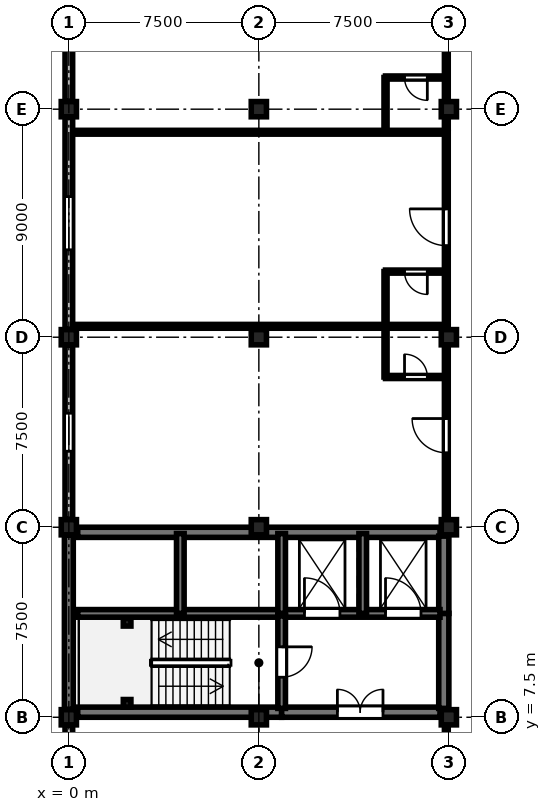
"""IFC4 building model, lengths in metres.
Left out: names, types, materials, properties, quantities, classifications, styles, units other than length and angle.
Written with IfcOpenShell. Run it as: python <this file> out.ifc"""

import sys

from ifc_helpers import new_model, si_unit, direction, frame, frame_2d, origin, origin_2d, place, context, subcontext, project, spatial, rectangle, circle, i_section, extrude, element, fill, save


model = new_model("IFC4")
c1 = context("Model", 3, precision=1e-05, world=origin(), true_north=direction((0.0, 1.0)))
c2 = subcontext(c1, "Body", "Model", "MODEL_VIEW")
j1 = project(units=[si_unit("LENGTHUNIT", "METRE"), si_unit("PLANEANGLEUNIT", "RADIAN")], contexts=[c1])
p1 = place(None, origin())
s1 = spatial("IfcSite", under=j1, at=p1, CompositionType="ELEMENT")
p2 = place(p1, origin())
s2 = spatial("IfcBuilding", under=s1, at=p2, CompositionType="ELEMENT")
p3 = place(p2, frame((0.0, 0.0, 21.9)))
s3 = spatial("IfcBuildingStorey", under=s2, at=p3, CompositionType="ELEMENT", Elevation=21.9)
for number, where, z_axis, x_axis in (
    (1, (0.0, 7.5, 0.0), (0.0, 0.0, 1.0), (1.0, 0.0, 0.0)),
    (2, (0.0, 15.0, 0.0), (0.0, 0.0, 1.0), (1.0, 0.0, 0.0)),
):
    element("IfcColumn", number, at=place(p3, frame(where, z_axis=z_axis, x_axis=x_axis)), inside=s3, PredefinedType="COLUMN", context=c2, shape_type="SweptSolid", body=[
        extrude(rectangle(XDim=0.6, YDim=0.6, at=origin_2d()), origin(), (0.0, 0.0, 1.0), 4.05),
    ])
p4 = place(p3, frame((0.0, 22.5, 0.0), z_axis=(0.0, 0.0, 1.0), x_axis=(1.0, 0.0, 0.0)))
e3 = element("IfcColumn", 3, at=p4, inside=s3, PredefinedType="COLUMN", context=c2, shape_type="SweptSolid", body=[
    extrude(circle(Radius=0.3, at=origin_2d()), origin(), (0.0, 0.0, 1.0), 4.05),
])
for number, where, z_axis, x_axis in (
    (4, (0.0, 31.5, 0.0), (0.0, 0.0, 1.0), (1.0, 0.0, 0.0)),
    (5, (7.5, 7.5, 0.0), (0.0, 0.0, 1.0), (1.0, 0.0, 0.0)),
):
    element("IfcColumn", number, at=place(p3, frame(where, z_axis=z_axis, x_axis=x_axis)), inside=s3, PredefinedType="COLUMN", context=c2, shape_type="SweptSolid", body=[
        extrude(rectangle(XDim=0.6, YDim=0.6, at=origin_2d()), origin(), (0.0, 0.0, 1.0), 4.05),
    ])
p5 = place(p3, frame((7.5, 15.0, 0.0), z_axis=(0.0, 0.0, 1.0), x_axis=(1.0, 0.0, 0.0)))
e6 = element("IfcColumn", 6, at=p5, inside=s3, PredefinedType="COLUMN", context=c2, shape_type="SweptSolid", body=[
    extrude(circle(Radius=0.3, at=origin_2d()), origin(), (0.0, 0.0, 1.0), 4.05),
])
for number, where, z_axis, x_axis in (
    (7, (7.5, 22.5, 0.0), (0.0, 0.0, 1.0), (1.0, 0.0, 0.0)),
    (8, (7.5, 31.5, 0.0), (0.0, 0.0, 1.0), (1.0, 0.0, 0.0)),
):
    element("IfcColumn", number, at=place(p3, frame(where, z_axis=z_axis, x_axis=x_axis)), inside=s3, PredefinedType="COLUMN", context=c2, shape_type="SweptSolid", body=[
        extrude(rectangle(XDim=0.6, YDim=0.6, at=origin_2d()), origin(), (0.0, 0.0, 1.0), 4.05),
    ])
p6 = place(p3, frame((15.0, 7.5, 0.0), z_axis=(0.0, 0.0, 1.0), x_axis=(1.0, 0.0, 0.0)))
e9 = element("IfcColumn", 9, at=p6, inside=s3, PredefinedType="COLUMN", context=c2, shape_type="SweptSolid", body=[
    extrude(circle(Radius=0.3, at=origin_2d()), origin(), (0.0, 0.0, 1.0), 4.05),
])
for number, where, z_axis, x_axis in (
    (10, (15.0, 15.0, 0.0), (0.0, 0.0, 1.0), (1.0, 0.0, 0.0)),
    (11, (15.0, 22.5, 0.0), (0.0, 0.0, 1.0), (1.0, 0.0, 0.0)),
):
    element("IfcColumn", number, at=place(p3, frame(where, z_axis=z_axis, x_axis=x_axis)), inside=s3, PredefinedType="COLUMN", context=c2, shape_type="SweptSolid", body=[
        extrude(rectangle(XDim=0.6, YDim=0.6, at=origin_2d()), origin(), (0.0, 0.0, 1.0), 4.05),
    ])
p7 = place(p3, frame((15.0, 31.5, 0.0), z_axis=(0.0, 0.0, 1.0), x_axis=(1.0, 0.0, 0.0)))
e12 = element("IfcColumn", 12, at=p7, inside=s3, PredefinedType="COLUMN", context=c2, shape_type="SweptSolid", body=[
    extrude(circle(Radius=0.3, at=origin_2d()), origin(), (0.0, 0.0, 1.0), 4.05),
])
for number, where, z_axis, x_axis in (
    (13, (2.3, 8.05, 0.0), (0.0, 0.0, 1.0), (1.0, 0.0, 0.0)),
    (14, (2.3, 11.25, 0.0), (0.0, 0.0, 1.0), (1.0, 0.0, 0.0)),
):
    element("IfcColumn", number, at=place(p3, frame(where, z_axis=z_axis, x_axis=x_axis)), inside=s3, PredefinedType="COLUMN", context=c2, shape_type="SweptSolid", body=[
        extrude(i_section(OverallWidth=0.3, OverallDepth=0.3, WebThickness=0.011, FlangeThickness=0.019, FilletRadius=0.027, at=origin_2d()), origin(), (0.0, 0.0, 1.0), 4.05),
    ])
p8 = place(p3, frame((0.0, 0.285, 0.0), z_axis=(0.0, 0.0, 1.0), x_axis=(0.0, 1.0, 0.0)))
e15 = element("IfcWall", 15, at=p8, inside=s3, PredefinedType="STANDARD", context=c2, shape_type="SweptSolid", body=[
    extrude(rectangle(XDim=6.905, YDim=0.3, at=frame_2d((3.453, 0.0))), origin(), (0.0, 0.0, 1.0), 3.17),
])
p9 = place(p8, frame((2.552, 0.0, 0.9)))
e16 = element("IfcOpeningElement", 16, at=p9, cuts=e15, PredefinedType="OPENING", context=c2, shape_type="SweptSolid", body=[
    extrude(rectangle(XDim=1.8, YDim=1.8, at=frame_2d((0.9, 0.9))), frame((0.0, 0.16, 0.0), z_axis=(0.0, -1.0, 0.0), x_axis=(1.0, 0.0, 0.0)), (0.0, 0.0, 1.0), 0.32),
])
p10 = place(p3, frame((0.0, 7.81, 0.0), z_axis=(0.0, 0.0, 1.0), x_axis=(0.0, 1.0, 0.0)))
e17 = element("IfcWall", 17, at=p10, inside=s3, PredefinedType="SHEAR", context=c2, shape_type="SweptSolid", body=[
    extrude(rectangle(XDim=6.88, YDim=0.35, at=frame_2d((3.44, 0.0))), origin(), (0.0, 0.0, 1.0), 3.77),
])
p11 = place(p3, frame((0.0, 15.31, 0.0), z_axis=(0.0, 0.0, 1.0), x_axis=(0.0, 1.0, 0.0)))
e18 = element("IfcWall", 18, at=p11, inside=s3, PredefinedType="STANDARD", context=c2, shape_type="SweptSolid", body=[
    extrude(rectangle(XDim=6.88, YDim=0.3, at=frame_2d((3.44, 0.0))), origin(), (0.0, 0.0, 1.0), 3.17),
])
p12 = place(p11, frame((2.69, 0.0, 0.9)))
e19 = element("IfcOpeningElement", 19, at=p12, cuts=e18, PredefinedType="OPENING", context=c2, shape_type="SweptSolid", body=[
    extrude(rectangle(XDim=1.5, YDim=1.99, at=frame_2d((0.75, 0.995))), frame((0.0, 0.16, 0.0), z_axis=(0.0, -1.0, 0.0), x_axis=(1.0, 0.0, 0.0)), (0.0, 0.0, 1.0), 0.32),
])
p13 = place(p3, frame((0.0, 22.81, 0.0), z_axis=(0.0, 0.0, 1.0), x_axis=(0.0, 1.0, 0.0)))
e20 = element("IfcWall", 20, at=p13, inside=s3, PredefinedType="STANDARD", context=c2, shape_type="SweptSolid", body=[
    extrude(rectangle(XDim=8.38, YDim=0.3, at=frame_2d((4.19, 0.0))), origin(), (0.0, 0.0, 1.0), 3.22),
])
p14 = place(p13, frame((3.14, 0.0, 0.9)))
e21 = element("IfcOpeningElement", 21, at=p14, cuts=e20, PredefinedType="OPENING", context=c2, shape_type="SweptSolid", body=[
    extrude(rectangle(XDim=2.1, YDim=2.04, at=frame_2d((1.05, 1.02))), frame((0.0, 0.16, 0.0), z_axis=(0.0, -1.0, 0.0), x_axis=(1.0, 0.0, 0.0)), (0.0, 0.0, 1.0), 0.32),
])
p15 = place(p3, frame((0.0, 31.81, 0.0), z_axis=(0.0, 0.0, 1.0), x_axis=(0.0, 1.0, 0.0)))
e22 = element("IfcWall", 22, at=p15, inside=s3, PredefinedType="STANDARD", context=c2, shape_type="SweptSolid", body=[
    extrude(rectangle(XDim=6.88, YDim=0.3, at=frame_2d((3.44, 0.0))), origin(), (0.0, 0.0, 1.0), 3.17),
])
p16 = place(p15, frame((2.24, 0.0, 0.9)))
e23 = element("IfcOpeningElement", 23, at=p16, cuts=e22, PredefinedType="OPENING", context=c2, shape_type="SweptSolid", body=[
    extrude(rectangle(XDim=2.4, YDim=1.99, at=frame_2d((1.2, 0.995))), frame((0.0, 0.16, 0.0), z_axis=(0.0, -1.0, 0.0), x_axis=(1.0, 0.0, 0.0)), (0.0, 0.0, 1.0), 0.32),
])
p17 = place(p3, frame((0.35, 7.7, 0.0), z_axis=(0.0, 0.0, 1.0), x_axis=(1.0, 0.0, 0.0)))
e24 = element("IfcWall", 24, at=p17, inside=s3, PredefinedType="SHEAR", context=c2, shape_type="SweptSolid", body=[
    extrude(rectangle(XDim=8.05, YDim=0.4, at=frame_2d((4.025, 0.0))), origin(), (0.0, 0.0, 1.0), 3.77),
])
p18 = place(p3, frame((8.4, 7.7, 0.0), z_axis=(0.0, 0.0, 1.0), x_axis=(1.0, 0.0, 0.0)))
e25 = element("IfcWall", 25, at=p18, inside=s3, PredefinedType="SHEAR", context=c2, shape_type="SweptSolid", body=[
    extrude(rectangle(XDim=6.25, YDim=0.4, at=frame_2d((3.125, 0.0))), origin(), (0.0, 0.0, 1.0), 3.77),
])
p19 = place(p18, frame((2.2, 0.0, 0.0)))
e26 = element("IfcOpeningElement", 26, at=p19, cuts=e25, PredefinedType="OPENING", context=c2, shape_type="SweptSolid", body=[
    extrude(rectangle(XDim=1.8, YDim=2.25, at=frame_2d((0.9, 1.125))), frame((0.0, 0.21, 0.0), z_axis=(0.0, -1.0, 0.0), x_axis=(1.0, 0.0, 0.0)), (0.0, 0.0, 1.0), 0.42),
])
p20 = place(p3, frame((0.35, 14.8, 0.0), z_axis=(0.0, 0.0, 1.0), x_axis=(1.0, 0.0, 0.0)))
e27 = element("IfcWall", 27, at=p20, inside=s3, PredefinedType="SHEAR", context=c2, shape_type="SweptSolid", body=[
    extrude(rectangle(XDim=14.3, YDim=0.4, at=frame_2d((7.15, 0.0))), origin(), (0.0, 0.0, 1.0), 3.77),
])
p21 = place(p3, frame((14.8, 7.85, 0.0), z_axis=(0.0, 0.0, 1.0), x_axis=(0.0, 1.0, 0.0)))
e28 = element("IfcWall", 28, at=p21, inside=s3, PredefinedType="SHEAR", context=c2, shape_type="SweptSolid", body=[
    extrude(rectangle(XDim=3.75, YDim=0.4, at=frame_2d((1.875, 0.0))), origin(), (0.0, 0.0, 1.0), 3.77),
])
p22 = place(p3, frame((14.8, 11.6, 0.0), z_axis=(0.0, 0.0, 1.0), x_axis=(0.0, 1.0, 0.0)))
e29 = element("IfcWall", 29, at=p22, inside=s3, PredefinedType="SHEAR", context=c2, shape_type="SweptSolid", body=[
    extrude(rectangle(XDim=3.05, YDim=0.4, at=frame_2d((1.525, 0.0))), origin(), (0.0, 0.0, 1.0), 3.77),
])
p23 = place(p3, frame((0.35, 11.6, 0.0), z_axis=(0.0, 0.0, 1.0), x_axis=(1.0, 0.0, 0.0)))
e30 = element("IfcWall", 30, at=p23, inside=s3, PredefinedType="SHEAR", context=c2, shape_type="SweptSolid", body=[
    extrude(rectangle(XDim=8.05, YDim=0.3, at=frame_2d((4.025, 0.0))), origin(), (0.0, 0.0, 1.0), 3.77),
])
p24 = place(p3, frame((8.4, 11.6, 0.0), z_axis=(0.0, 0.0, 1.0), x_axis=(1.0, 0.0, 0.0)))
e31 = element("IfcWall", 31, at=p24, inside=s3, PredefinedType="SHEAR", context=c2, shape_type="SweptSolid", body=[
    extrude(rectangle(XDim=6.25, YDim=0.3, at=frame_2d((3.125, 0.0))), origin(), (0.0, 0.0, 1.0), 3.77),
])
p25 = place(p24, frame((0.9, 0.0, 0.0)))
e32 = element("IfcOpeningElement", 32, at=p25, cuts=e31, PredefinedType="OPENING", context=c2, shape_type="SweptSolid", body=[
    extrude(rectangle(XDim=1.4, YDim=2.25, at=frame_2d((0.7, 1.125))), frame((0.0, 0.16, 0.0), z_axis=(0.0, -1.0, 0.0), x_axis=(1.0, 0.0, 0.0)), (0.0, 0.0, 1.0), 0.32),
])
p26 = place(p24, frame((4.1, 0.0, 0.0)))
e33 = element("IfcOpeningElement", 33, at=p26, cuts=e31, PredefinedType="OPENING", context=c2, shape_type="SweptSolid", body=[
    extrude(rectangle(XDim=1.4, YDim=2.25, at=frame_2d((0.7, 1.125))), frame((0.0, 0.16, 0.0), z_axis=(0.0, -1.0, 0.0), x_axis=(1.0, 0.0, 0.0)), (0.0, 0.0, 1.0), 0.32),
])
p27 = place(p3, frame((8.4, 11.5, 0.0), z_axis=(0.0, 0.0, 1.0), x_axis=(0.0, -1.0, 0.0)))
e34 = element("IfcWall", 34, at=p27, inside=s3, PredefinedType="SHEAR", context=c2, shape_type="SweptSolid", body=[
    extrude(rectangle(XDim=3.65, YDim=0.3, at=frame_2d((1.825, 0.0))), origin(), (0.0, 0.0, 1.0), 3.77),
])
p28 = place(p27, frame((1.22, 0.0, 0.0)))
e35 = element("IfcOpeningElement", 35, at=p28, cuts=e34, PredefinedType="OPENING", context=c2, shape_type="SweptSolid", body=[
    extrude(rectangle(XDim=1.2, YDim=2.25, at=frame_2d((0.6, 1.125))), frame((0.0, 0.16, 0.0), z_axis=(0.0, -1.0, 0.0), x_axis=(1.0, 0.0, 0.0)), (0.0, 0.0, 1.0), 0.32),
])
for number, where, z_axis, x_axis in (
    (36, (4.4, 11.6, 0.0), (0.0, 0.0, 1.0), (0.0, 1.0, 0.0)),
    (37, (8.4, 11.6, 0.0), (0.0, 0.0, 1.0), (0.0, 1.0, 0.0)),
    (38, (11.6, 11.6, 0.0), (0.0, 0.0, 1.0), (0.0, 1.0, 0.0)),
):
    element("IfcWall", number, at=place(p3, frame(where, z_axis=z_axis, x_axis=x_axis)), inside=s3, PredefinedType="SHEAR", context=c2, shape_type="SweptSolid", body=[
        extrude(rectangle(XDim=3.15, YDim=0.3, at=frame_2d((1.575, 0.0))), origin(), (0.0, 0.0, 1.0), 3.77),
    ])
p29 = place(p3, frame((14.9, 2.68, 0.0), z_axis=(0.0, 0.0, 1.0), x_axis=(0.0, 1.0, 0.0)))
e39 = element("IfcWall", 39, at=p29, inside=s3, PredefinedType="PARTITIONING", context=c2, shape_type="SweptSolid", body=[
    extrude(rectangle(XDim=4.39, YDim=0.15, at=frame_2d((2.195, 0.0))), origin(), (0.0, 0.0, 1.0), 3.205),
])
p30 = place(p29, frame((0.504, 0.0, 0.0)))
e40 = element("IfcOpeningElement", 40, at=p30, cuts=e39, PredefinedType="OPENING", context=c2, shape_type="SweptSolid", body=[
    extrude(rectangle(XDim=1.35, YDim=2.25, at=frame_2d((0.675, 1.125))), frame((0.0, 0.085, 0.0), z_axis=(0.0, -1.0, 0.0), x_axis=(1.0, 0.0, 0.0)), (0.0, 0.0, 1.0), 0.17),
])
p31 = place(p3, frame((14.9, 15.43, 0.0), z_axis=(0.0, 0.0, 1.0), x_axis=(0.0, 1.0, 0.0)))
e41 = element("IfcWall", 41, at=p31, inside=s3, PredefinedType="PARTITIONING", context=c2, shape_type="SweptSolid", body=[
    extrude(rectangle(XDim=7.5, YDim=0.15, at=frame_2d((3.75, 0.0))), origin(), (0.0, 0.0, 1.0), 3.055),
])
p32 = place(p31, frame((2.51, 0.0, 0.0)))
e42 = element("IfcOpeningElement", 42, at=p32, cuts=e41, PredefinedType="OPENING", context=c2, shape_type="SweptSolid", body=[
    extrude(rectangle(XDim=1.35, YDim=2.25, at=frame_2d((0.675, 1.125))), frame((0.0, 0.085, 0.0), z_axis=(0.0, -1.0, 0.0), x_axis=(1.0, 0.0, 0.0)), (0.0, 0.0, 1.0), 0.17),
])
p33 = place(p3, frame((12.5, 20.93, 0.0), z_axis=(0.0, 0.0, 1.0), x_axis=(1.0, 0.0, 0.0)))
e43 = element("IfcWall", 43, at=p33, inside=s3, PredefinedType="PARTITIONING", context=c2, shape_type="SweptSolid", body=[
    extrude(rectangle(XDim=2.4, YDim=0.12, at=frame_2d((1.2, 0.0))), origin(), (0.0, 0.0, 1.0), 3.755),
])
p34 = place(p33, frame((0.75, 0.0, 0.0)))
e44 = element("IfcOpeningElement", 44, at=p34, cuts=e43, PredefinedType="OPENING", context=c2, shape_type="SweptSolid", body=[
    extrude(rectangle(XDim=0.9, YDim=2.1, at=frame_2d((0.45, 1.05))), frame((0.0, 0.07, 0.0), z_axis=(0.0, -1.0, 0.0), x_axis=(1.0, 0.0, 0.0)), (0.0, 0.0, 1.0), 0.14),
])
p35 = place(p3, frame((12.5, 20.93, 0.0), z_axis=(0.0, 0.0, 1.0), x_axis=(0.0, 1.0, 0.0)))
e45 = element("IfcWall", 45, at=p35, inside=s3, PredefinedType="PARTITIONING", context=c2, shape_type="SweptSolid", body=[
    extrude(rectangle(XDim=2.0, YDim=0.12, at=frame_2d((1.0, 0.0))), origin(), (0.0, 0.0, 1.0), 3.755),
])
p36 = place(p3, frame((14.9, 23.09, 0.0), z_axis=(0.0, 0.0, 1.0), x_axis=(0.0, 1.0, 0.0)))
e46 = element("IfcWall", 46, at=p36, inside=s3, PredefinedType="PARTITIONING", context=c2, shape_type="SweptSolid", body=[
    extrude(rectangle(XDim=7.5, YDim=0.15, at=frame_2d((3.75, 0.0))), origin(), (0.0, 0.0, 1.0), 3.055),
])
p37 = place(p36, frame((3.025, 0.0, 0.0)))
e47 = element("IfcOpeningElement", 47, at=p37, cuts=e46, PredefinedType="OPENING", context=c2, shape_type="SweptSolid", body=[
    extrude(rectangle(XDim=1.45, YDim=2.3, at=frame_2d((0.725, 1.15))), frame((0.0, 0.085, 0.0), z_axis=(0.0, -1.0, 0.0), x_axis=(1.0, 0.0, 0.0)), (0.0, 0.0, 1.0), 0.17),
])
p38 = place(p3, frame((14.9, 25.09, 0.0), z_axis=(0.0, 0.0, 1.0), x_axis=(-1.0, 0.0, 0.0)))
e48 = element("IfcWall", 48, at=p38, inside=s3, PredefinedType="PARTITIONING", context=c2, shape_type="SweptSolid", body=[
    extrude(rectangle(XDim=2.4, YDim=0.12, at=frame_2d((1.2, 0.0))), origin(), (0.0, 0.0, 1.0), 3.755),
])
p39 = place(p38, frame((0.75, 0.0, 0.0)))
e49 = element("IfcOpeningElement", 49, at=p39, cuts=e48, PredefinedType="OPENING", context=c2, shape_type="SweptSolid", body=[
    extrude(rectangle(XDim=0.9, YDim=2.1, at=frame_2d((0.45, 1.05))), frame((0.0, 0.07, 0.0), z_axis=(0.0, -1.0, 0.0), x_axis=(1.0, 0.0, 0.0)), (0.0, 0.0, 1.0), 0.14),
])
p40 = place(p3, frame((12.5, 23.09, 0.0), z_axis=(0.0, 0.0, 1.0), x_axis=(0.0, 1.0, 0.0)))
e50 = element("IfcWall", 50, at=p40, inside=s3, PredefinedType="PARTITIONING", context=c2, shape_type="SweptSolid", body=[
    extrude(rectangle(XDim=2.0, YDim=0.12, at=frame_2d((1.0, 0.0))), origin(), (0.0, 0.0, 1.0), 3.755),
])
p41 = place(p3, frame((14.9, 30.75, 0.0), z_axis=(0.0, 0.0, 1.0), x_axis=(0.0, 1.0, 0.0)))
e51 = element("IfcWall", 51, at=p41, inside=s3, PredefinedType="PARTITIONING", context=c2, shape_type="SweptSolid", body=[
    extrude(rectangle(XDim=7.5, YDim=0.15, at=frame_2d((3.75, 0.0))), origin(), (0.0, 0.0, 1.0), 3.055),
])
p42 = place(p41, frame((3.64, 0.0, 0.0)))
e52 = element("IfcOpeningElement", 52, at=p42, cuts=e51, PredefinedType="OPENING", context=c2, shape_type="SweptSolid", body=[
    extrude(rectangle(XDim=1.35, YDim=2.25, at=frame_2d((0.675, 1.125))), frame((0.0, 0.085, 0.0), z_axis=(0.0, -1.0, 0.0), x_axis=(1.0, 0.0, 0.0)), (0.0, 0.0, 1.0), 0.17),
])
p43 = place(p3, frame((14.9, 32.75, 0.0), z_axis=(0.0, 0.0, 1.0), x_axis=(-1.0, 0.0, 0.0)))
e53 = element("IfcWall", 53, at=p43, inside=s3, PredefinedType="PARTITIONING", context=c2, shape_type="SweptSolid", body=[
    extrude(rectangle(XDim=2.4, YDim=0.12, at=frame_2d((1.2, 0.0))), origin(), (0.0, 0.0, 1.0), 3.755),
])
p44 = place(p43, frame((0.75, 0.0, 0.0)))
e54 = element("IfcOpeningElement", 54, at=p44, cuts=e53, PredefinedType="OPENING", context=c2, shape_type="SweptSolid", body=[
    extrude(rectangle(XDim=0.9, YDim=2.1, at=frame_2d((0.45, 1.05))), frame((0.0, 0.07, 0.0), z_axis=(0.0, -1.0, 0.0), x_axis=(1.0, 0.0, 0.0)), (0.0, 0.0, 1.0), 0.14),
])
p45 = place(p3, frame((12.5, 30.75, 0.0), z_axis=(0.0, 0.0, 1.0), x_axis=(0.0, 1.0, 0.0)))
e55 = element("IfcWall", 55, at=p45, inside=s3, PredefinedType="PARTITIONING", context=c2, shape_type="SweptSolid", body=[
    extrude(rectangle(XDim=2.0, YDim=0.12, at=frame_2d((1.0, 0.0))), origin(), (0.0, 0.0, 1.0), 3.755),
])
for number, where, z_axis, x_axis in (
    (56, (0.35, 22.93, 0.0), (0.0, 0.0, 1.0), (1.0, 0.0, 0.0)),
    (57, (0.35, 30.59, 0.0), (0.0, 0.0, 1.0), (1.0, 0.0, 0.0)),
):
    element("IfcWall", number, at=place(p3, frame(where, z_axis=z_axis, x_axis=x_axis)), inside=s3, PredefinedType="PARTITIONING", context=c2, shape_type="SweptSolid", body=[
        extrude(rectangle(XDim=14.55, YDim=0.15, at=frame_2d((7.275, 0.0))), origin(), (0.0, 0.0, 1.0), 3.755),
    ])
p46 = place(p12, origin())
e58 = element("IfcWindow", 58, at=p46, inside=s3, PartitioningType="SINGLE_PANEL", PredefinedType="WINDOW", context=c2, shape_type="SweptSolid", body=[
    extrude(rectangle(XDim=1.5, YDim=1.99, at=frame_2d((0.75, 0.995))), frame((0.0, 0.03, 0.0), z_axis=(0.0, -1.0, 0.0), x_axis=(1.0, 0.0, 0.0)), (0.0, 0.0, 1.0), 0.06),
])
fill(e19, e58)
p47 = place(p14, origin())
e59 = element("IfcWindow", 59, at=p47, inside=s3, PartitioningType="SINGLE_PANEL", PredefinedType="WINDOW", context=c2, shape_type="SweptSolid", body=[
    extrude(rectangle(XDim=2.1, YDim=2.04, at=frame_2d((1.05, 1.02))), frame((0.0, 0.03, 0.0), z_axis=(0.0, -1.0, 0.0), x_axis=(1.0, 0.0, 0.0)), (0.0, 0.0, 1.0), 0.06),
])
fill(e21, e59)
p48 = place(p19, origin())
e60 = element("IfcDoor", 60, at=p48, inside=s3, OperationType="DOUBLE_DOOR_SINGLE_SWING", PredefinedType="DOOR", context=c2, shape_type="SweptSolid", body=[
    extrude(rectangle(XDim=1.8, YDim=2.25, at=frame_2d((0.9, 1.125))), frame((0.0, 0.025, 0.0), z_axis=(0.0, -1.0, 0.0), x_axis=(1.0, 0.0, 0.0)), (0.0, 0.0, 1.0), 0.05),
])
fill(e26, e60)
p49 = place(p25, origin())
e61 = element("IfcDoor", 61, at=p49, inside=s3, OperationType="DOUBLE_DOOR_SLIDING", PredefinedType="DOOR", context=c2, shape_type="SweptSolid", body=[
    extrude(rectangle(XDim=1.4, YDim=2.25, at=frame_2d((0.7, 1.125))), frame((0.0, 0.025, 0.0), z_axis=(0.0, -1.0, 0.0), x_axis=(1.0, 0.0, 0.0)), (0.0, 0.0, 1.0), 0.05),
])
fill(e32, e61)
p50 = place(p26, origin())
e62 = element("IfcDoor", 62, at=p50, inside=s3, OperationType="DOUBLE_DOOR_SLIDING", PredefinedType="DOOR", context=c2, shape_type="SweptSolid", body=[
    extrude(rectangle(XDim=1.4, YDim=2.25, at=frame_2d((0.7, 1.125))), frame((0.0, 0.025, 0.0), z_axis=(0.0, -1.0, 0.0), x_axis=(1.0, 0.0, 0.0)), (0.0, 0.0, 1.0), 0.05),
])
fill(e33, e62)
p51 = place(p28, origin())
e63 = element("IfcDoor", 63, at=p51, inside=s3, OperationType="SINGLE_SWING_LEFT", PredefinedType="DOOR", context=c2, shape_type="SweptSolid", body=[
    extrude(rectangle(XDim=1.2, YDim=2.25, at=frame_2d((0.6, 1.125))), frame((0.0, 0.025, 0.0), z_axis=(0.0, -1.0, 0.0), x_axis=(1.0, 0.0, 0.0)), (0.0, 0.0, 1.0), 0.05),
])
fill(e35, e63)
p52 = place(p32, origin())
e64 = element("IfcDoor", 64, at=p52, inside=s3, OperationType="SINGLE_SWING_RIGHT", PredefinedType="DOOR", context=c2, shape_type="SweptSolid", body=[
    extrude(rectangle(XDim=1.35, YDim=2.25, at=frame_2d((0.675, 1.125))), frame((0.0, 0.025, 0.0), z_axis=(0.0, -1.0, 0.0), x_axis=(1.0, 0.0, 0.0)), (0.0, 0.0, 1.0), 0.05),
])
fill(e42, e64)
p53 = place(p34, origin())
e65 = element("IfcDoor", 65, at=p53, inside=s3, OperationType="SINGLE_SWING_LEFT", PredefinedType="DOOR", context=c2, shape_type="SweptSolid", body=[
    extrude(rectangle(XDim=0.9, YDim=2.1, at=frame_2d((0.45, 1.05))), frame((0.0, 0.025, 0.0), z_axis=(0.0, -1.0, 0.0), x_axis=(1.0, 0.0, 0.0)), (0.0, 0.0, 1.0), 0.05),
])
fill(e44, e65)
p54 = place(p37, origin())
e66 = element("IfcDoor", 66, at=p54, inside=s3, OperationType="SINGLE_SWING_RIGHT", PredefinedType="DOOR", context=c2, shape_type="SweptSolid", body=[
    extrude(rectangle(XDim=1.45, YDim=2.3, at=frame_2d((0.725, 1.15))), frame((0.0, 0.025, 0.0), z_axis=(0.0, -1.0, 0.0), x_axis=(1.0, 0.0, 0.0)), (0.0, 0.0, 1.0), 0.05),
])
fill(e47, e66)
p55 = place(p39, origin())
e67 = element("IfcDoor", 67, at=p55, inside=s3, OperationType="SINGLE_SWING_LEFT", PredefinedType="DOOR", context=c2, shape_type="SweptSolid", body=[
    extrude(rectangle(XDim=0.9, YDim=2.1, at=frame_2d((0.45, 1.05))), frame((0.0, 0.025, 0.0), z_axis=(0.0, -1.0, 0.0), x_axis=(1.0, 0.0, 0.0)), (0.0, 0.0, 1.0), 0.05),
])
fill(e49, e67)
p56 = place(p44, origin())
e68 = element("IfcDoor", 68, at=p56, inside=s3, OperationType="SINGLE_SWING_LEFT", PredefinedType="DOOR", context=c2, shape_type="SweptSolid", body=[
    extrude(rectangle(XDim=0.9, YDim=2.1, at=frame_2d((0.45, 1.05))), frame((0.0, 0.025, 0.0), z_axis=(0.0, -1.0, 0.0), x_axis=(1.0, 0.0, 0.0)), (0.0, 0.0, 1.0), 0.05),
])
fill(e54, e68)
save(model, sys.argv[1])
